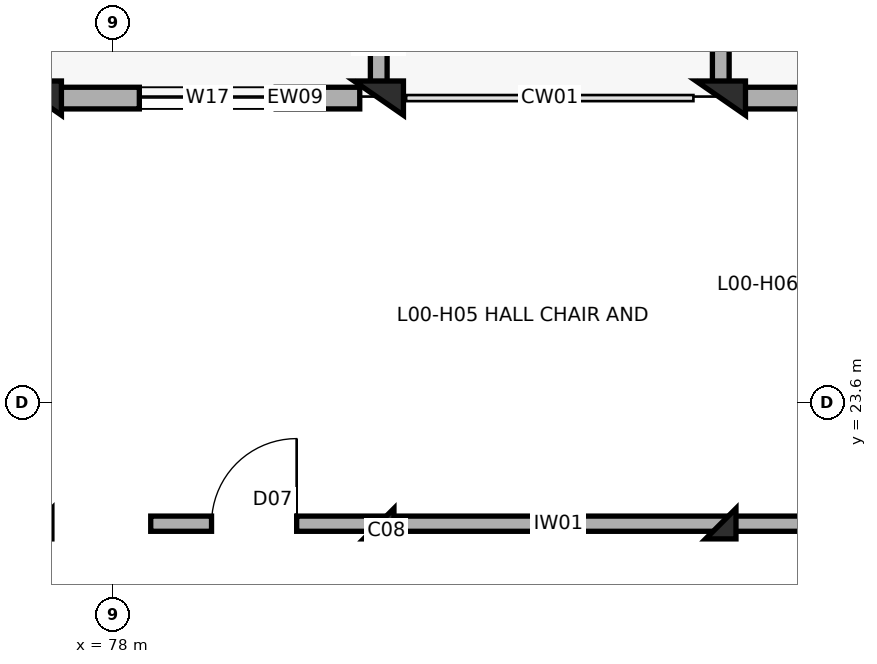
"""IFC4 building model, lengths in metres.
Left out: names, types, materials, properties, quantities, classifications, styles, units other than length and angle.
Written with IfcOpenShell. Run it as: python <this file> out.ifc"""

import sys

from ifc_helpers import new_model, si_unit, direction, frame, frame_2d, origin, origin_2d, place, context, subcontext, project, spatial, rectangle, extrude, element, fill, save


model = new_model("IFC4")
c1 = context("Model", 3, precision=1e-05, world=origin(), true_north=direction((0.0, 1.0)))
c2 = subcontext(c1, "Body", "Model", "MODEL_VIEW")
j1 = project(units=[si_unit("LENGTHUNIT", "METRE"), si_unit("PLANEANGLEUNIT", "RADIAN")], contexts=[c1])
p1 = place(None, origin())
s1 = spatial("IfcSite", under=j1, at=p1, CompositionType="ELEMENT")
p2 = place(p1, origin())
s2 = spatial("IfcBuilding", under=s1, at=p2, CompositionType="ELEMENT")
p3 = place(p2, origin())
s3 = spatial("IfcBuildingStorey", under=s2, at=p3, CompositionType="ELEMENT", Elevation=0.0)
for number, where, z_axis, x_axis in (
    (1, (77.0, 27.6, 0.0), (0.0, 0.0, 1.0), (0.0, 1.0, 0.0)),
    (2, (81.5, 27.6, 0.0), (0.0, 0.0, 1.0), (0.0, 1.0, 0.0)),
):
    element("IfcColumn", number, at=place(p3, frame(where, z_axis=z_axis, x_axis=x_axis)), inside=s3, PredefinedType="COLUMN", context=c2, shape_type="SweptSolid", body=[
        extrude(rectangle(XDim=0.45, YDim=0.65, at=origin_2d()), origin(), (0.0, 0.0, 1.0), 4.5),
    ])
p4 = place(p3, frame((81.5, 22.0, 0.0), z_axis=(0.0, 0.0, 1.0), x_axis=(1.0, 0.0, 0.0)))
e3 = element("IfcColumn", 3, at=p4, inside=s3, PredefinedType="COLUMN", context=c2, shape_type="SweptSolid", body=[
    extrude(rectangle(XDim=0.4, YDim=0.4, at=origin_2d()), origin(), (0.0, 0.0, 1.0), 4.5),
])
p5 = place(p3, frame((86.0, 27.6, 0.0), z_axis=(0.0, 0.0, 1.0), x_axis=(0.0, 1.0, 0.0)))
e4 = element("IfcColumn", 4, at=p5, inside=s3, PredefinedType="COLUMN", context=c2, shape_type="SweptSolid", body=[
    extrude(rectangle(XDim=0.45, YDim=0.65, at=origin_2d()), origin(), (0.0, 0.0, 1.0), 4.5),
])
p6 = place(p3, frame((86.0, 22.0, 0.0), z_axis=(0.0, 0.0, 1.0), x_axis=(1.0, 0.0, 0.0)))
e5 = element("IfcColumn", 5, at=p6, inside=s3, PredefinedType="COLUMN", context=c2, shape_type="SweptSolid", body=[
    extrude(rectangle(XDim=0.4, YDim=0.4, at=origin_2d()), origin(), (0.0, 0.0, 1.0), 4.5),
])
p7 = place(p3, frame((77.25, 27.6, 0.0), z_axis=(0.0, 0.0, 1.0), x_axis=(1.0, 0.0, 0.0)))
e6 = element("IfcWall", 6, at=p7, inside=s3, PredefinedType="SOLIDWALL", context=c2, shape_type="SweptSolid", body=[
    extrude(rectangle(XDim=4.0, YDim=0.285, at=frame_2d((2.0, 0.0))), origin(), (0.0, 0.0, 1.0), 3.5),
])
p8 = place(p7, frame((1.1, 0.0, 0.45)))
e7 = element("IfcOpeningElement", 7, at=p8, cuts=e6, PredefinedType="OPENING", context=c2, shape_type="SweptSolid", body=[
    extrude(rectangle(XDim=1.8, YDim=2.1, at=frame_2d((0.9, 1.05))), frame((0.0, 0.152, 0.0), z_axis=(0.0, -1.0, 0.0), x_axis=(1.0, 0.0, 0.0)), (0.0, 0.0, 1.0), 0.305),
])
p9 = place(p3, frame((86.25, 27.6, 0.0), z_axis=(0.0, 0.0, 1.0), x_axis=(1.0, 0.0, 0.0)))
e8 = element("IfcWall", 8, at=p9, inside=s3, PredefinedType="SOLIDWALL", context=c2, shape_type="SweptSolid", body=[
    extrude(rectangle(XDim=4.0, YDim=0.285, at=frame_2d((2.0, 0.0))), origin(), (0.0, 0.0, 1.0), 3.5),
])
p10 = place(p9, frame((1.1, 0.0, 0.45)))
e9 = element("IfcOpeningElement", 9, at=p10, cuts=e8, PredefinedType="OPENING", context=c2, shape_type="SweptSolid", body=[
    extrude(rectangle(XDim=1.8, YDim=2.1, at=frame_2d((0.9, 1.05))), frame((0.0, 0.152, 0.0), z_axis=(0.0, -1.0, 0.0), x_axis=(1.0, 0.0, 0.0)), (0.0, 0.0, 1.0), 0.305),
])
for number, where, z_axis, x_axis in (
    (10, (81.5, 27.78, 0.0), (0.0, 0.0, 1.0), (0.0, 1.0, 0.0)),
    (11, (86.0, 27.78, 0.0), (0.0, 0.0, 1.0), (0.0, 1.0, 0.0)),
):
    element("IfcWall", number, at=place(p3, frame(where, z_axis=z_axis, x_axis=x_axis)), inside=s3, PredefinedType="PARAPET", context=c2, shape_type="SweptSolid", body=[
        extrude(rectangle(XDim=0.87, YDim=0.22, at=frame_2d((0.435, 0.0))), origin(), (0.0, 0.0, 1.0), 4.5),
    ])
p11 = place(p3, frame((78.5, 22.0, 0.0), z_axis=(0.0, 0.0, 1.0), x_axis=(1.0, 0.0, 0.0)))
e12 = element("IfcWall", 12, at=p11, inside=s3, PredefinedType="SOLIDWALL", context=c2, shape_type="SweptSolid", body=[
    extrude(rectangle(XDim=20.3, YDim=0.2, at=frame_2d((10.15, 0.0))), origin(), (0.0, 0.0, 1.0), 3.4),
])
p12 = place(p11, frame((0.8, 0.0, 0.0)))
e13 = element("IfcOpeningElement", 13, at=p12, cuts=e12, PredefinedType="OPENING", context=c2, shape_type="SweptSolid", body=[
    extrude(rectangle(XDim=1.12, YDim=2.15, at=frame_2d((0.56, 1.075))), frame((0.0, 0.11, 0.0), z_axis=(0.0, -1.0, 0.0), x_axis=(1.0, 0.0, 0.0)), (0.0, 0.0, 1.0), 0.22),
])
p13 = place(p11, frame((9.4, 0.0, 0.0)))
e14 = element("IfcOpeningElement", 14, at=p13, cuts=e12, PredefinedType="OPENING", context=c2, shape_type="SweptSolid", body=[
    extrude(rectangle(XDim=0.88, YDim=2.1, at=frame_2d((0.44, 1.05))), frame((0.0, 0.11, 0.0), z_axis=(0.0, -1.0, 0.0), x_axis=(1.0, 0.0, 0.0)), (0.0, 0.0, 1.0), 0.22),
])
p14 = place(p11, frame((13.8, 0.0, 0.0)))
e15 = element("IfcOpeningElement", 15, at=p14, cuts=e12, PredefinedType="OPENING", context=c2, shape_type="SweptSolid", body=[
    extrude(rectangle(XDim=0.88, YDim=2.1, at=frame_2d((0.44, 1.05))), frame((0.0, 0.11, 0.0), z_axis=(0.0, -1.0, 0.0), x_axis=(1.0, 0.0, 0.0)), (0.0, 0.0, 1.0), 0.22),
])
p15 = place(p11, frame((17.8, 0.0, 0.0)))
e16 = element("IfcOpeningElement", 16, at=p15, cuts=e12, PredefinedType="OPENING", context=c2, shape_type="SweptSolid", body=[
    extrude(rectangle(XDim=0.95, YDim=2.1, at=frame_2d((0.475, 1.05))), frame((0.0, 0.11, 0.0), z_axis=(0.0, -1.0, 0.0), x_axis=(1.0, 0.0, 0.0)), (0.0, 0.0, 1.0), 0.22),
])
p16 = place(p8, origin())
e17 = element("IfcWindow", 17, at=p16, inside=s3, PartitioningType="DOUBLE_PANEL_HORIZONTAL", PredefinedType="WINDOW", context=c2, shape_type="SweptSolid", body=[
    extrude(rectangle(XDim=1.8, YDim=2.1, at=frame_2d((0.9, 1.05))), frame((0.0, 0.03, 0.0), z_axis=(0.0, -1.0, 0.0), x_axis=(1.0, 0.0, 0.0)), (0.0, 0.0, 1.0), 0.06),
])
fill(e7, e17)
p17 = place(p12, origin())
e18 = element("IfcDoor", 18, at=p17, inside=s3, OperationType="SINGLE_SWING_RIGHT", PredefinedType="DOOR", context=c2, shape_type="SweptSolid", body=[
    extrude(rectangle(XDim=1.12, YDim=2.15, at=frame_2d((0.56, 1.075))), frame((0.0, 0.025, 0.0), z_axis=(0.0, -1.0, 0.0), x_axis=(1.0, 0.0, 0.0)), (0.0, 0.0, 1.0), 0.05),
])
fill(e13, e18)
save(model, sys.argv[1])
